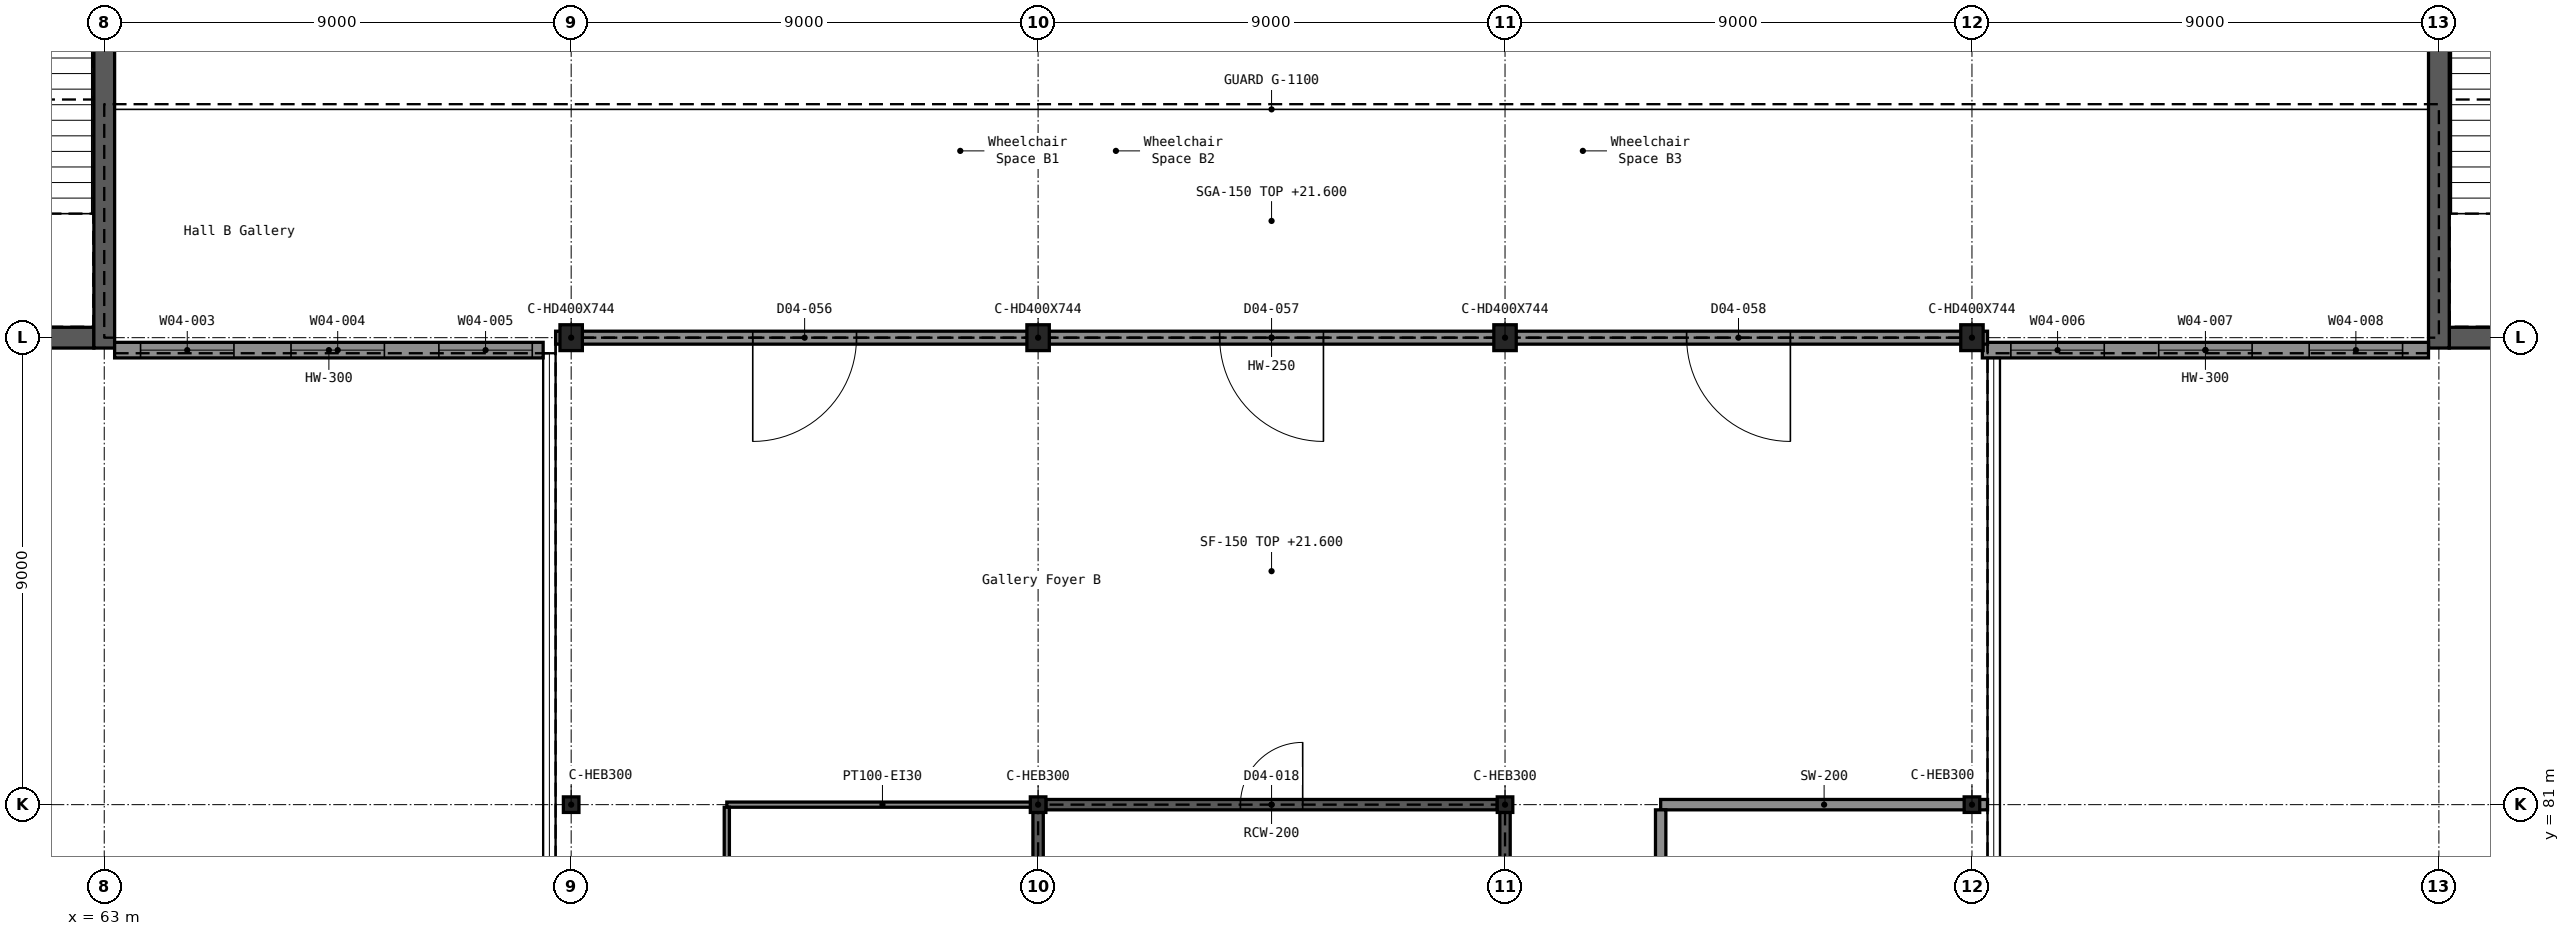
"""IFC4 building model, lengths in metres.
Left out: names, types, materials, properties, quantities, classifications, styles, units other than length and angle.
Written with IfcOpenShell. Run it as: python <this file> out.ifc"""

import sys

from ifc_helpers import new_model, si_unit, direction, frame, frame_2d, origin, origin_2d, place, context, subcontext, project, spatial, rectangle, i_section, extrude, element, fill, save


model = new_model("IFC4")
c1 = context("Model", 3, precision=1e-05, world=origin(), true_north=direction((0.0, 1.0)))
c2 = subcontext(c1, "Body", "Model", "MODEL_VIEW")
j1 = project(units=[si_unit("LENGTHUNIT", "METRE"), si_unit("PLANEANGLEUNIT", "RADIAN")], contexts=[c1])
p1 = place(None, origin())
s1 = spatial("IfcSite", under=j1, at=p1, CompositionType="ELEMENT")
p2 = place(p1, origin())
s2 = spatial("IfcBuilding", under=s1, at=p2, CompositionType="ELEMENT")
p3 = place(p2, frame((0.0, 0.0, 21.6)))
s3 = spatial("IfcBuildingStorey", under=s2, at=p3, CompositionType="ELEMENT", Elevation=21.6)
for number, where, z_axis, x_axis in (
    (1, (72.0, 81.0, 0.0), (0.0, 0.0, 1.0), (0.0, 1.0, 0.0)),
    (2, (81.0, 81.0, 0.0), (0.0, 0.0, 1.0), (1.0, 0.0, 0.0)),
    (3, (90.0, 81.0, 0.0), (0.0, 0.0, 1.0), (1.0, 0.0, 0.0)),
    (4, (99.0, 81.0, 0.0), (0.0, 0.0, 1.0), (0.0, 1.0, 0.0)),
):
    element("IfcColumn", number, at=place(p3, frame(where, z_axis=z_axis, x_axis=x_axis)), inside=s3, PredefinedType="COLUMN", context=c2, shape_type="SweptSolid", body=[
        extrude(i_section(OverallWidth=0.3, OverallDepth=0.3, WebThickness=0.011, FlangeThickness=0.019, FilletRadius=0.027, at=origin_2d()), origin(), (0.0, 0.0, 1.0), 5.4),
    ])
for number, where, z_axis, x_axis in (
    (5, (72.0, 90.0, 0.0), (0.0, 0.0, 1.0), (1.0, 0.0, 0.0)),
    (6, (81.0, 90.0, 0.0), (0.0, 0.0, 1.0), (1.0, 0.0, 0.0)),
    (7, (90.0, 90.0, 0.0), (0.0, 0.0, 1.0), (1.0, 0.0, 0.0)),
    (8, (99.0, 90.0, 0.0), (0.0, 0.0, 1.0), (1.0, 0.0, 0.0)),
):
    element("IfcColumn", number, at=place(p3, frame(where, z_axis=z_axis, x_axis=x_axis)), inside=s3, PredefinedType="COLUMN", context=c2, shape_type="SweptSolid", body=[
        extrude(i_section(OverallWidth=0.432, OverallDepth=0.498, WebThickness=0.056, FlangeThickness=0.089, FilletRadius=0.015, at=origin_2d()), origin(), (0.0, 0.0, 1.0), 5.4),
    ])
p4 = place(p3, frame((54.2, 90.0, 0.0), z_axis=(0.0, 0.0, 1.0), x_axis=(1.0, 0.0, 0.0)))
e9 = element("IfcWall", 9, at=p4, inside=s3, PredefinedType="SHEAR", context=c2, shape_type="SweptSolid", body=[
    extrude(rectangle(XDim=8.6, YDim=0.4, at=frame_2d((4.3, 0.0))), origin(), (0.0, 0.0, 1.0), 5.4),
])
p5 = place(p4, frame((3.9, 0.0, 1.5)))
e10 = element("IfcOpeningElement", 10, at=p5, cuts=e9, PredefinedType="OPENING", context=c2, shape_type="SweptSolid", body=[
    extrude(rectangle(XDim=1.2, YDim=1.8, at=frame_2d((0.6, 0.9))), frame((0.0, 0.211, 0.0), z_axis=(0.0, -1.0, 0.0), x_axis=(1.0, 0.0, 0.0)), (0.0, 0.0, 1.0), 0.422),
])
p6 = place(p3, frame((63.0, 89.8, 0.0), z_axis=(0.0, 0.0, 1.0), x_axis=(0.0, 1.0, 0.0)))
e11 = element("IfcWall", 11, at=p6, inside=s3, PredefinedType="SHEAR", context=c2, shape_type="SweptSolid", body=[
    extrude(rectangle(XDim=27.4, YDim=0.4, at=frame_2d((13.7, 0.0))), origin(), (0.0, 0.0, 1.0), 5.4),
])
p7 = place(p3, frame((108.2, 90.0, 0.0), z_axis=(0.0, 0.0, 1.0), x_axis=(1.0, 0.0, 0.0)))
e12 = element("IfcWall", 12, at=p7, inside=s3, PredefinedType="SHEAR", context=c2, shape_type="SweptSolid", body=[
    extrude(rectangle(XDim=8.6, YDim=0.4, at=frame_2d((4.3, 0.0))), origin(), (0.0, 0.0, 1.0), 5.4),
])
p8 = place(p7, frame((3.9, 0.0, 1.5)))
e13 = element("IfcOpeningElement", 13, at=p8, cuts=e12, PredefinedType="OPENING", context=c2, shape_type="SweptSolid", body=[
    extrude(rectangle(XDim=1.2, YDim=1.8, at=frame_2d((0.6, 0.9))), frame((0.0, 0.211, 0.0), z_axis=(0.0, -1.0, 0.0), x_axis=(1.0, 0.0, 0.0)), (0.0, 0.0, 1.0), 0.422),
])
p9 = place(p3, frame((108.0, 89.8, 0.0), z_axis=(0.0, 0.0, 1.0), x_axis=(0.0, 1.0, 0.0)))
e14 = element("IfcWall", 14, at=p9, inside=s3, PredefinedType="SHEAR", context=c2, shape_type="SweptSolid", body=[
    extrude(rectangle(XDim=27.4, YDim=0.4, at=frame_2d((13.7, 0.0))), origin(), (0.0, 0.0, 1.0), 5.4),
])
p10 = place(p3, frame((63.2, 89.76, 0.0), z_axis=(0.0, 0.0, 1.0), x_axis=(1.0, 0.0, 0.0)))
e15 = element("IfcWall", 15, at=p10, inside=s3, PredefinedType="SOLIDWALL", context=c2, shape_type="SweptSolid", body=[
    extrude(rectangle(XDim=8.26, YDim=0.3, at=frame_2d((4.13, 0.0))), origin(), (0.0, 0.0, 1.0), 5.4),
])
p11 = place(p10, frame((0.5, 0.0, 3.0)))
e16 = element("IfcOpeningElement", 16, at=p11, cuts=e15, PredefinedType="OPENING", context=c2, shape_type="SweptSolid", body=[
    extrude(rectangle(XDim=1.8, YDim=1.8, at=frame_2d((0.9, 0.9))), frame((0.0, 0.161, 0.0), z_axis=(0.0, -1.0, 0.0), x_axis=(1.0, 0.0, 0.0)), (0.0, 0.0, 1.0), 0.322),
])
p12 = place(p10, frame((3.4, 0.0, 3.0)))
e17 = element("IfcOpeningElement", 17, at=p12, cuts=e15, PredefinedType="OPENING", context=c2, shape_type="SweptSolid", body=[
    extrude(rectangle(XDim=1.8, YDim=1.8, at=frame_2d((0.9, 0.9))), frame((0.0, 0.161, 0.0), z_axis=(0.0, -1.0, 0.0), x_axis=(1.0, 0.0, 0.0)), (0.0, 0.0, 1.0), 0.322),
])
p13 = place(p10, frame((6.25, 0.0, 3.0)))
e18 = element("IfcOpeningElement", 18, at=p13, cuts=e15, PredefinedType="OPENING", context=c2, shape_type="SweptSolid", body=[
    extrude(rectangle(XDim=1.8, YDim=1.8, at=frame_2d((0.9, 0.9))), frame((0.0, 0.161, 0.0), z_axis=(0.0, -1.0, 0.0), x_axis=(1.0, 0.0, 0.0)), (0.0, 0.0, 1.0), 0.322),
])
p14 = place(p3, frame((99.2, 89.76, 0.0), z_axis=(0.0, 0.0, 1.0), x_axis=(1.0, 0.0, 0.0)))
e19 = element("IfcWall", 19, at=p14, inside=s3, PredefinedType="SOLIDWALL", context=c2, shape_type="SweptSolid", body=[
    extrude(rectangle(XDim=8.6, YDim=0.3, at=frame_2d((4.3, 0.0))), origin(), (0.0, 0.0, 1.0), 5.4),
])
p15 = place(p14, frame((0.55, 0.0, 3.0)))
e20 = element("IfcOpeningElement", 20, at=p15, cuts=e19, PredefinedType="OPENING", context=c2, shape_type="SweptSolid", body=[
    extrude(rectangle(XDim=1.8, YDim=1.8, at=frame_2d((0.9, 0.9))), frame((0.0, 0.161, 0.0), z_axis=(0.0, -1.0, 0.0), x_axis=(1.0, 0.0, 0.0)), (0.0, 0.0, 1.0), 0.322),
])
p16 = place(p14, frame((3.4, 0.0, 3.0)))
e21 = element("IfcOpeningElement", 21, at=p16, cuts=e19, PredefinedType="OPENING", context=c2, shape_type="SweptSolid", body=[
    extrude(rectangle(XDim=1.8, YDim=1.8, at=frame_2d((0.9, 0.9))), frame((0.0, 0.161, 0.0), z_axis=(0.0, -1.0, 0.0), x_axis=(1.0, 0.0, 0.0)), (0.0, 0.0, 1.0), 0.322),
])
p17 = place(p14, frame((6.3, 0.0, 3.0)))
e22 = element("IfcOpeningElement", 22, at=p17, cuts=e19, PredefinedType="OPENING", context=c2, shape_type="SweptSolid", body=[
    extrude(rectangle(XDim=1.8, YDim=1.8, at=frame_2d((0.9, 0.9))), frame((0.0, 0.161, 0.0), z_axis=(0.0, -1.0, 0.0), x_axis=(1.0, 0.0, 0.0)), (0.0, 0.0, 1.0), 0.322),
])
p18 = place(p3, frame((81.15, 81.0, 0.0), z_axis=(0.0, 0.0, 1.0), x_axis=(1.0, 0.0, 0.0)))
e23 = element("IfcWall", 23, at=p18, inside=s3, PredefinedType="SHEAR", context=c2, shape_type="SweptSolid", body=[
    extrude(rectangle(XDim=8.7, YDim=0.2, at=frame_2d((4.35, 0.0))), origin(), (0.0, 0.0, 1.0), 5.4),
])
p19 = place(p18, frame((3.75, 0.0, 0.0)))
e24 = element("IfcOpeningElement", 24, at=p19, cuts=e23, PredefinedType="OPENING", context=c2, shape_type="SweptSolid", body=[
    extrude(rectangle(XDim=1.2, YDim=2.1, at=frame_2d((0.6, 1.05))), frame((0.0, 0.111, 0.0), z_axis=(0.0, -1.0, 0.0), x_axis=(1.0, 0.0, 0.0)), (0.0, 0.0, 1.0), 0.222),
])
for number, where, z_axis, x_axis in (
    (25, (81.0, 72.15, 0.0), (0.0, 0.0, 1.0), (0.0, 1.0, 0.0)),
    (26, (90.0, 72.15, 0.0), (0.0, 0.0, 1.0), (0.0, 1.0, 0.0)),
):
    element("IfcWall", number, at=place(p3, frame(where, z_axis=z_axis, x_axis=x_axis)), inside=s3, PredefinedType="SHEAR", context=c2, shape_type="SweptSolid", body=[
        extrude(rectangle(XDim=8.7, YDim=0.2, at=frame_2d((4.35, 0.0))), origin(), (0.0, 0.0, 1.0), 5.4),
    ])
p20 = place(p3, frame((71.7, 90.0, 0.0), z_axis=(0.0, 0.0, 1.0), x_axis=(1.0, 0.0, 0.0)))
e27 = element("IfcWall", 27, at=p20, inside=s3, PredefinedType="SOLIDWALL", context=c2, shape_type="SweptSolid", body=[
    extrude(rectangle(XDim=27.6, YDim=0.25, at=frame_2d((13.8, 0.0))), origin(), (0.0, 0.0, 1.0), 5.4),
])
p21 = place(p20, frame((3.8, 0.0, 0.0)))
e28 = element("IfcOpeningElement", 28, at=p21, cuts=e27, PredefinedType="OPENING", context=c2, shape_type="SweptSolid", body=[
    extrude(rectangle(XDim=2.0, YDim=2.4, at=frame_2d((1.0, 1.2))), frame((0.0, 0.136, 0.0), z_axis=(0.0, -1.0, 0.0), x_axis=(1.0, 0.0, 0.0)), (0.0, 0.0, 1.0), 0.272),
])
p22 = place(p20, frame((12.8, 0.0, 0.0)))
e29 = element("IfcOpeningElement", 29, at=p22, cuts=e27, PredefinedType="OPENING", context=c2, shape_type="SweptSolid", body=[
    extrude(rectangle(XDim=2.0, YDim=2.4, at=frame_2d((1.0, 1.2))), frame((0.0, 0.136, 0.0), z_axis=(0.0, -1.0, 0.0), x_axis=(1.0, 0.0, 0.0)), (0.0, 0.0, 1.0), 0.272),
])
p23 = place(p20, frame((21.8, 0.0, 0.0)))
e30 = element("IfcOpeningElement", 30, at=p23, cuts=e27, PredefinedType="OPENING", context=c2, shape_type="SweptSolid", body=[
    extrude(rectangle(XDim=2.0, YDim=2.4, at=frame_2d((1.0, 1.2))), frame((0.0, 0.136, 0.0), z_axis=(0.0, -1.0, 0.0), x_axis=(1.0, 0.0, 0.0)), (0.0, 0.0, 1.0), 0.272),
])
p24 = place(p3, frame((93.0, 81.0, 0.0), z_axis=(0.0, 0.0, 1.0), x_axis=(1.0, 0.0, 0.0)))
e31 = element("IfcWall", 31, at=p24, inside=s3, PredefinedType="SOLIDWALL", context=c2, shape_type="SweptSolid", body=[
    extrude(rectangle(XDim=6.3, YDim=0.2, at=frame_2d((3.15, 0.0))), origin(), (0.0, 0.0, 1.0), 5.4),
])
p25 = place(p3, frame((93.0, 72.1, 0.0), z_axis=(0.0, 0.0, 1.0), x_axis=(0.0, 1.0, 0.0)))
e32 = element("IfcWall", 32, at=p25, inside=s3, PredefinedType="SOLIDWALL", context=c2, shape_type="SweptSolid", body=[
    extrude(rectangle(XDim=8.8, YDim=0.2, at=frame_2d((4.4, 0.0))), origin(), (0.0, 0.0, 1.0), 5.4),
])
p26 = place(p25, frame((3.8, 0.0, 0.0)))
e33 = element("IfcOpeningElement", 33, at=p26, cuts=e32, PredefinedType="OPENING", context=c2, shape_type="SweptSolid", body=[
    extrude(rectangle(XDim=1.2, YDim=2.4, at=frame_2d((0.6, 1.2))), frame((0.0, 0.111, 0.0), z_axis=(0.0, -1.0, 0.0), x_axis=(1.0, 0.0, 0.0)), (0.0, 0.0, 1.0), 0.222),
])
p27 = place(p3, frame((75.0, 81.0, 0.0), z_axis=(0.0, 0.0, 1.0), x_axis=(1.0, 0.0, 0.0)))
e34 = element("IfcWall", 34, at=p27, inside=s3, PredefinedType="PARTITIONING", context=c2, shape_type="SweptSolid", body=[
    extrude(rectangle(XDim=6.0, YDim=0.1, at=frame_2d((3.0, 0.0))), origin(), (0.0, 0.0, 1.0), 5.4),
])
p28 = place(p3, frame((75.0, 72.05, 0.0), z_axis=(0.0, 0.0, 1.0), x_axis=(0.0, 1.0, 0.0)))
e35 = element("IfcWall", 35, at=p28, inside=s3, PredefinedType="PARTITIONING", context=c2, shape_type="SweptSolid", body=[
    extrude(rectangle(XDim=8.9, YDim=0.1, at=frame_2d((4.45, 0.0))), origin(), (0.0, 0.0, 1.0), 5.4),
])
p29 = place(p28, frame((3.95, 0.0, 0.0)))
e36 = element("IfcOpeningElement", 36, at=p29, cuts=e35, PredefinedType="OPENING", context=c2, shape_type="SweptSolid", body=[
    extrude(rectangle(XDim=1.0, YDim=2.1, at=frame_2d((0.5, 1.05))), frame((0.0, 0.061, 0.0), z_axis=(0.0, -1.0, 0.0), x_axis=(1.0, 0.0, 0.0)), (0.0, 0.0, 1.0), 0.122),
])
p30 = place(p11, origin())
e37 = element("IfcWindow", 37, at=p30, inside=s3, PartitioningType="SINGLE_PANEL", PredefinedType="WINDOW", context=c2, shape_type="SweptSolid", body=[
    extrude(rectangle(XDim=1.8, YDim=1.8, at=frame_2d((0.9, 0.9))), frame((0.0, 0.03, 0.0), z_axis=(0.0, -1.0, 0.0), x_axis=(1.0, 0.0, 0.0)), (0.0, 0.0, 1.0), 0.06),
])
fill(e16, e37)
p31 = place(p12, origin())
e38 = element("IfcWindow", 38, at=p31, inside=s3, PartitioningType="SINGLE_PANEL", PredefinedType="WINDOW", context=c2, shape_type="SweptSolid", body=[
    extrude(rectangle(XDim=1.8, YDim=1.8, at=frame_2d((0.9, 0.9))), frame((0.0, 0.03, 0.0), z_axis=(0.0, -1.0, 0.0), x_axis=(1.0, 0.0, 0.0)), (0.0, 0.0, 1.0), 0.06),
])
fill(e17, e38)
p32 = place(p13, origin())
e39 = element("IfcWindow", 39, at=p32, inside=s3, PartitioningType="SINGLE_PANEL", PredefinedType="WINDOW", context=c2, shape_type="SweptSolid", body=[
    extrude(rectangle(XDim=1.8, YDim=1.8, at=frame_2d((0.9, 0.9))), frame((0.0, 0.03, 0.0), z_axis=(0.0, -1.0, 0.0), x_axis=(1.0, 0.0, 0.0)), (0.0, 0.0, 1.0), 0.06),
])
fill(e18, e39)
p33 = place(p15, origin())
e40 = element("IfcWindow", 40, at=p33, inside=s3, PartitioningType="SINGLE_PANEL", PredefinedType="WINDOW", context=c2, shape_type="SweptSolid", body=[
    extrude(rectangle(XDim=1.8, YDim=1.8, at=frame_2d((0.9, 0.9))), frame((0.0, 0.03, 0.0), z_axis=(0.0, -1.0, 0.0), x_axis=(1.0, 0.0, 0.0)), (0.0, 0.0, 1.0), 0.06),
])
fill(e20, e40)
p34 = place(p16, origin())
e41 = element("IfcWindow", 41, at=p34, inside=s3, PartitioningType="SINGLE_PANEL", PredefinedType="WINDOW", context=c2, shape_type="SweptSolid", body=[
    extrude(rectangle(XDim=1.8, YDim=1.8, at=frame_2d((0.9, 0.9))), frame((0.0, 0.03, 0.0), z_axis=(0.0, -1.0, 0.0), x_axis=(1.0, 0.0, 0.0)), (0.0, 0.0, 1.0), 0.06),
])
fill(e21, e41)
p35 = place(p17, origin())
e42 = element("IfcWindow", 42, at=p35, inside=s3, PartitioningType="SINGLE_PANEL", PredefinedType="WINDOW", context=c2, shape_type="SweptSolid", body=[
    extrude(rectangle(XDim=1.8, YDim=1.8, at=frame_2d((0.9, 0.9))), frame((0.0, 0.03, 0.0), z_axis=(0.0, -1.0, 0.0), x_axis=(1.0, 0.0, 0.0)), (0.0, 0.0, 1.0), 0.06),
])
fill(e22, e42)
p36 = place(p19, origin())
e43 = element("IfcDoor", 43, at=p36, inside=s3, OperationType="SINGLE_SWING_RIGHT", PredefinedType="DOOR", context=c2, shape_type="SweptSolid", body=[
    extrude(rectangle(XDim=1.2, YDim=2.1, at=frame_2d((0.6, 1.05))), frame((0.0, 0.025, 0.0), z_axis=(0.0, -1.0, 0.0), x_axis=(1.0, 0.0, 0.0)), (0.0, 0.0, 1.0), 0.05),
])
fill(e24, e43)
p37 = place(p21, frame((2.0, 0.0, 0.0), z_axis=(0.0, 0.0, 1.0), x_axis=(-1.0, 0.0, 0.0)))
e44 = element("IfcDoor", 44, at=p37, inside=s3, OperationType="DOUBLE_DOOR_SINGLE_SWING", PredefinedType="DOOR", context=c2, shape_type="SweptSolid", body=[
    extrude(rectangle(XDim=2.0, YDim=2.4, at=frame_2d((1.0, 1.2))), frame((0.0, 0.025, 0.0), z_axis=(0.0, -1.0, 0.0), x_axis=(1.0, 0.0, 0.0)), (0.0, 0.0, 1.0), 0.05),
])
fill(e28, e44)
p38 = place(p22, frame((2.0, 0.0, 0.0), z_axis=(0.0, 0.0, 1.0), x_axis=(-1.0, 0.0, 0.0)))
e45 = element("IfcDoor", 45, at=p38, inside=s3, OperationType="DOUBLE_DOOR_SINGLE_SWING", PredefinedType="DOOR", context=c2, shape_type="SweptSolid", body=[
    extrude(rectangle(XDim=2.0, YDim=2.4, at=frame_2d((1.0, 1.2))), frame((0.0, 0.025, 0.0), z_axis=(0.0, -1.0, 0.0), x_axis=(1.0, 0.0, 0.0)), (0.0, 0.0, 1.0), 0.05),
])
fill(e29, e45)
p39 = place(p23, frame((2.0, 0.0, 0.0), z_axis=(0.0, 0.0, 1.0), x_axis=(-1.0, 0.0, 0.0)))
e46 = element("IfcDoor", 46, at=p39, inside=s3, OperationType="DOUBLE_DOOR_SINGLE_SWING", PredefinedType="DOOR", context=c2, shape_type="SweptSolid", body=[
    extrude(rectangle(XDim=2.0, YDim=2.4, at=frame_2d((1.0, 1.2))), frame((0.0, 0.025, 0.0), z_axis=(0.0, -1.0, 0.0), x_axis=(1.0, 0.0, 0.0)), (0.0, 0.0, 1.0), 0.05),
])
fill(e30, e46)
save(model, sys.argv[1])
